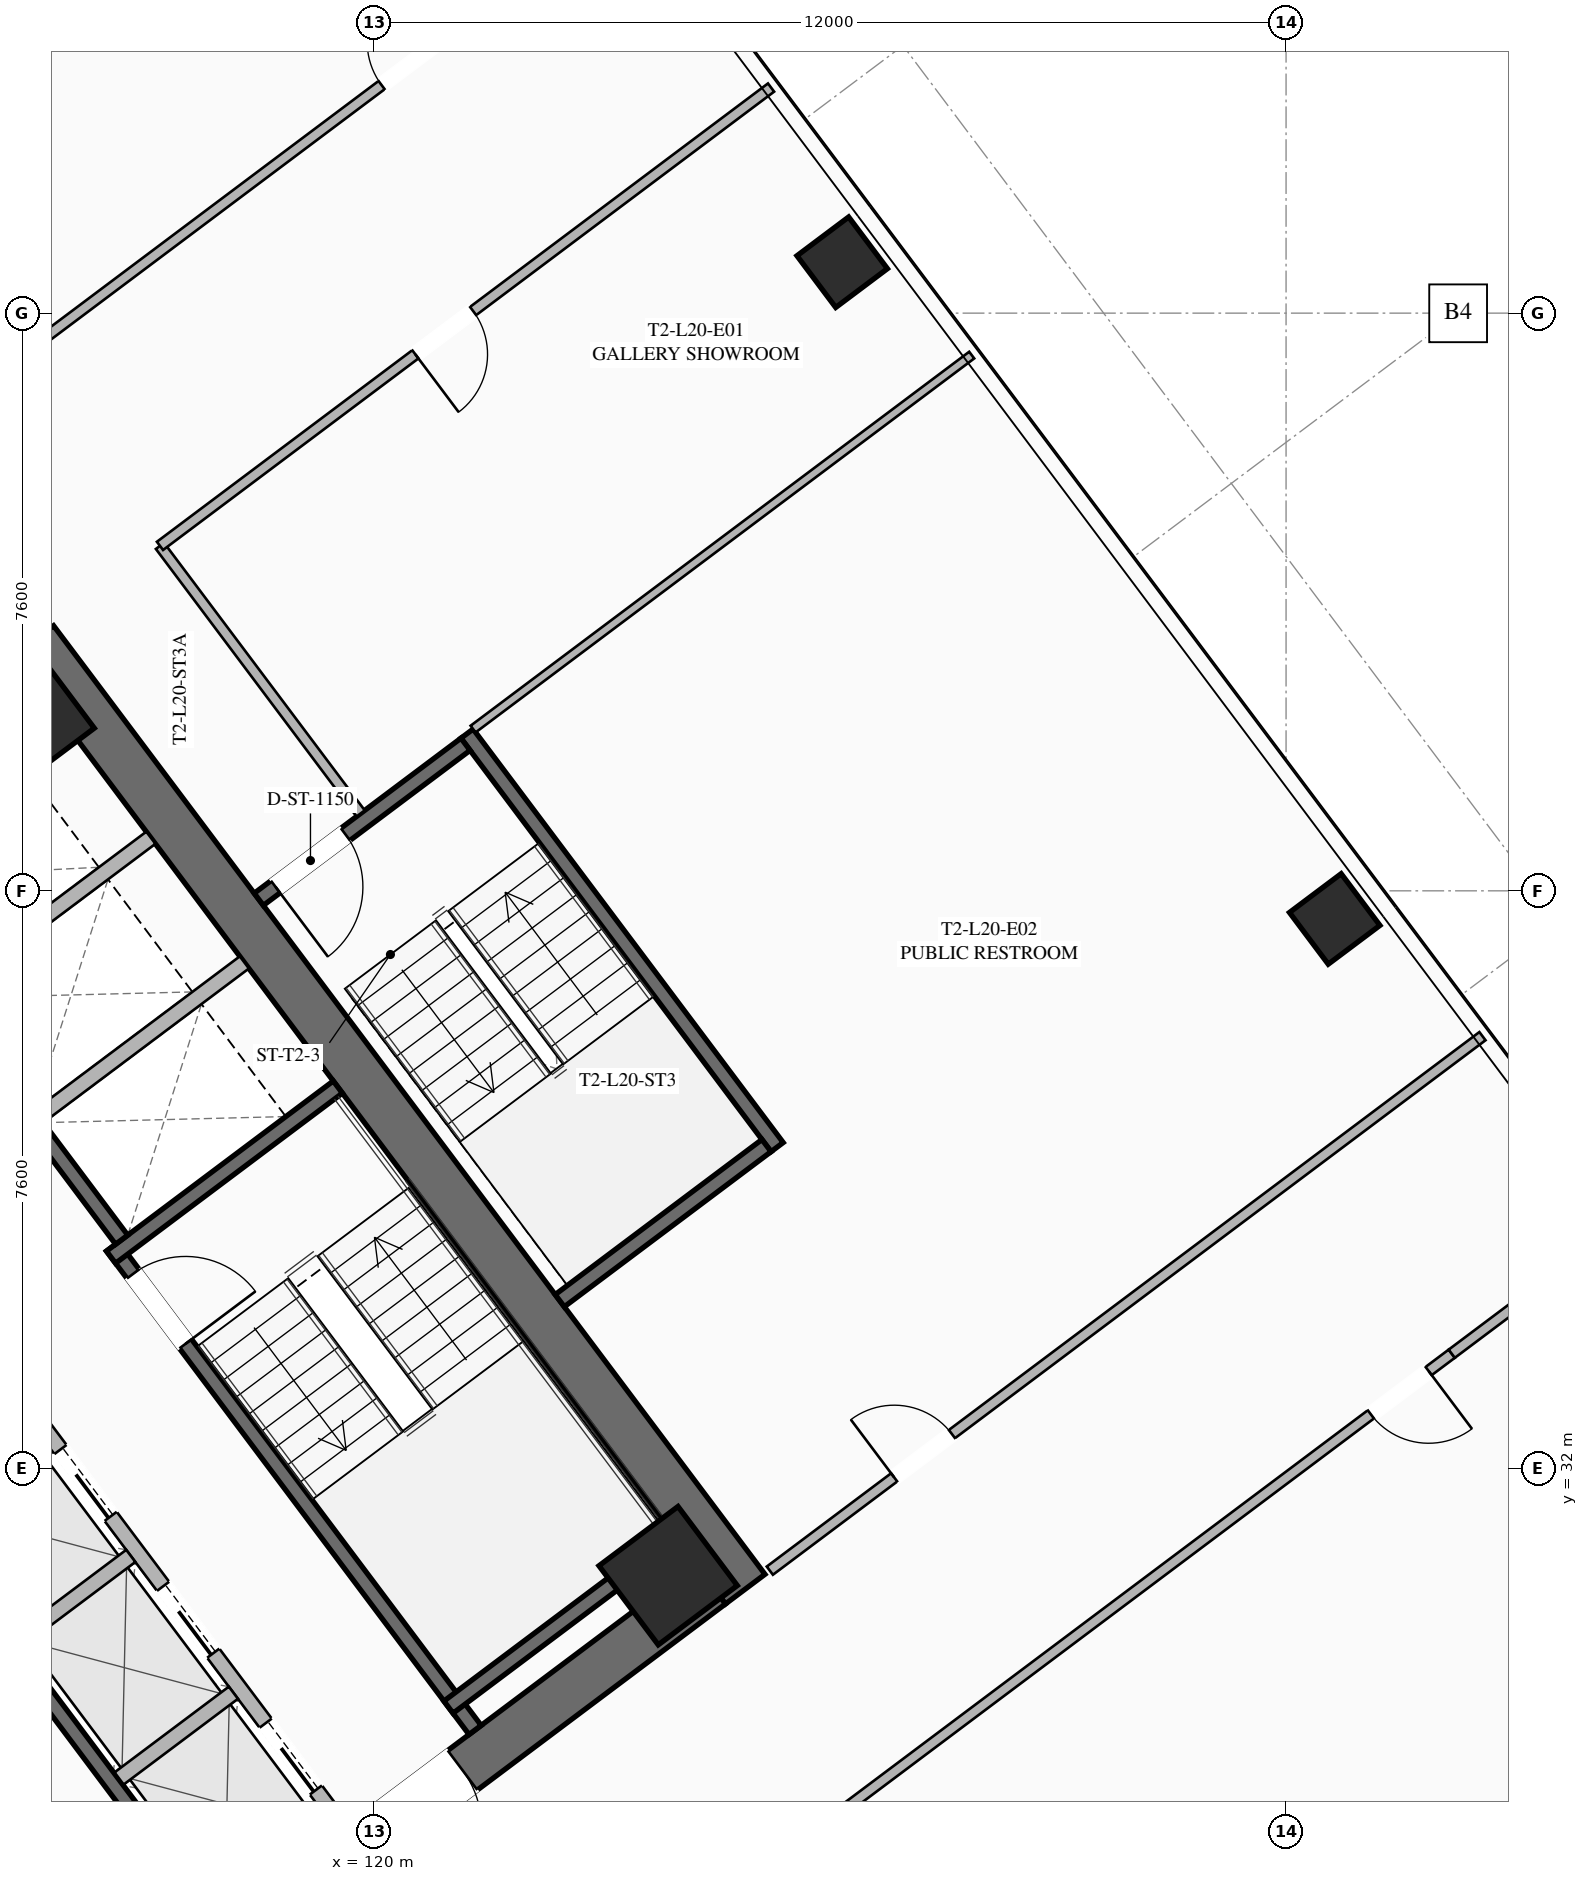
"""IFC4 building model, lengths in metres.
Left out: names, types, materials, properties, quantities, classifications, styles, units other than length and angle.
Written with IfcOpenShell. Run it as: python <this file> out.ifc"""

import sys

from ifc_helpers import new_model, si_unit, direction, frame, frame_2d, origin, origin_2d, place, context, subcontext, project, spatial, rectangle, hollow_rectangle, extrude, element, fill, save


model = new_model("IFC4")
c1 = context("Model", 3, precision=1e-05, world=origin(), true_north=direction((0.0, 1.0)))
c2 = subcontext(c1, "Body", "Model", "MODEL_VIEW")
j1 = project(units=[si_unit("LENGTHUNIT", "METRE"), si_unit("PLANEANGLEUNIT", "RADIAN")], contexts=[c1])
p1 = place(None, origin())
s1 = spatial("IfcSite", under=j1, at=p1, CompositionType="ELEMENT")
p2 = place(p1, origin())
s2 = spatial("IfcBuilding", under=s1, at=p2, CompositionType="ELEMENT")
p3 = place(p2, frame((0.0, 0.0, 77.85)))
s3 = spatial("IfcBuildingStorey", under=s2, at=p3, CompositionType="ELEMENT", Elevation=77.85)
p4 = place(p3, frame((115.524, 42.893, 0.0), z_axis=(0.0, 0.0, 1.0), x_axis=(0.600005007985, -0.799996243986, 0.0)))
e1 = element("IfcWall", 1, at=p4, inside=s3, PredefinedType="SHEAR", context=c2, shape_type="SweptSolid", body=[
    extrude(rectangle(XDim=15.6, YDim=0.65, at=frame_2d((7.8, 0.0))), origin(), (0.0, 0.0, 1.0), 3.55),
])
p5 = place(p3, frame((124.429, 30.478, 0.0), z_axis=(0.0, 0.0, 1.0), x_axis=(-0.799998028465, -0.600002628705, 0.0)))
e2 = element("IfcWall", 2, at=p5, inside=s3, PredefinedType="SHEAR", context=c2, shape_type="SweptSolid", body=[
    extrude(rectangle(XDim=14.86, YDim=0.65, at=frame_2d((7.43, 0.0))), origin(), (0.0, 0.0, 1.0), 3.55),
])
p6 = place(p5, frame((9.13, 0.0, 0.0)))
e3 = element("IfcOpeningElement", 3, at=p6, cuts=e2, PredefinedType="OPENING", context=c2, shape_type="SweptSolid", body=[
    extrude(rectangle(XDim=1.25, YDim=2.25, at=frame_2d((0.625, 1.125))), frame((0.0, 0.335, 0.0), z_axis=(0.0, -1.0, 0.0), x_axis=(1.0, 0.0, 0.0)), (0.0, 0.0, 1.0), 0.67),
])
p7 = place(p5, frame((4.08, 0.0, 0.0)))
e4 = element("IfcOpeningElement", 4, at=p7, cuts=e2, PredefinedType="OPENING", context=c2, shape_type="SweptSolid", body=[
    extrude(rectangle(XDim=1.25, YDim=2.25, at=frame_2d((0.625, 1.125))), frame((0.0, 0.335, 0.0), z_axis=(0.0, -1.0, 0.0), x_axis=(1.0, 0.0, 0.0)), (0.0, 0.0, 1.0), 0.67),
])
for number, where, z_axis, x_axis in (
    (5, (123.87, 30.59, 0.0), (0.0, 0.0, 1.0), (0.8, 0.6, 0.0)),
    (6, (115.41, 41.87, 0.0), (0.0, 0.0, 1.0), (0.8, 0.6, 0.0)),
):
    element("IfcColumn", number, at=place(p3, frame(where, z_axis=z_axis, x_axis=x_axis)), inside=s3, PredefinedType="COLUMN", context=c2, shape_type="SweptSolid", body=[
        extrude(hollow_rectangle(XDim=1.3, YDim=1.3, WallThickness=0.05, at=origin_2d()), origin(), (0.0, 0.0, 1.0), 3.35),
    ])
for number, where, z_axis, x_axis in (
    (7, (132.64, 39.23, 0.0), (0.0, 0.0, 1.0), (0.8, 0.6, 0.0)),
    (8, (126.16, 47.87, 0.0), (0.0, 0.0, 1.0), (0.8, 0.6, 0.0)),
):
    element("IfcColumn", number, at=place(p3, frame(where, z_axis=z_axis, x_axis=x_axis)), inside=s3, PredefinedType="COLUMN", context=c2, shape_type="SweptSolid", body=[
        extrude(hollow_rectangle(XDim=0.85, YDim=0.85, WallThickness=0.035, at=origin_2d()), origin(), (0.0, 0.0, 1.0), 3.35),
    ])
p8 = place(p3, frame((116.56, 34.92, 0.0), z_axis=(0.0, 0.0, 1.0), x_axis=(0.600009827119, -0.799992629566, 0.0)))
e9 = element("IfcWall", 9, at=p8, inside=s3, PredefinedType="SHEAR", context=c2, shape_type="SweptSolid", body=[
    extrude(rectangle(XDim=7.95, YDim=0.2, at=frame_2d((3.975, 0.0))), origin(), (0.0, 0.0, 1.0), 3.35),
])
p9 = place(p8, frame((0.45, 0.0, 0.0)))
e10 = element("IfcOpeningElement", 10, at=p9, cuts=e9, PredefinedType="OPENING", context=c2, shape_type="SweptSolid", body=[
    extrude(rectangle(XDim=1.15, YDim=2.2, at=frame_2d((0.575, 1.1))), frame((0.0, 0.11, 0.0), z_axis=(0.0, -1.0, 0.0), x_axis=(1.0, 0.0, 0.0)), (0.0, 0.0, 1.0), 0.22),
])
for number, where, z_axis, x_axis in (
    (11, (116.54, 34.78, 0.0), (0.0, 0.0, 1.0), (0.8, 0.6, 0.0)),
    (12, (120.98, 28.86, 0.0), (0.0, 0.0, 1.0), (0.8, 0.6, 0.0)),
):
    element("IfcWall", number, at=place(p3, frame(where, z_axis=z_axis, x_axis=x_axis)), inside=s3, PredefinedType="SHEAR", context=c2, shape_type="SweptSolid", body=[
        extrude(rectangle(XDim=3.73, YDim=0.2, at=frame_2d((1.865, 0.0))), origin(), (0.0, 0.0, 1.0), 3.35),
    ])
p10 = place(p3, frame((117.938, 26.016, 0.0), z_axis=(0.0, 0.0, 1.0), x_axis=(-0.600005463273, 0.799995902516, 0.0)))
e13 = element("IfcWall", 13, at=p10, inside=s3, PredefinedType="SHEAR", context=c2, shape_type="SweptSolid", body=[
    extrude(rectangle(XDim=14.3, YDim=0.2, at=frame_2d((7.15, 0.0))), origin(), (0.0, 0.0, 1.0), 3.35),
])
p11 = place(p3, frame((112.87, 40.09, 0.0), z_axis=(0.0, 0.0, 1.0), x_axis=(0.599975393228, -0.800018454488, 0.0)))
e14 = element("IfcWall", 14, at=p11, inside=s3, PredefinedType="SHEAR", context=c2, shape_type="SweptSolid", body=[
    extrude(rectangle(XDim=6.35, YDim=0.2, at=frame_2d((3.175, 0.0))), origin(), (0.0, 0.0, 1.0), 3.35),
])
for number, where, z_axis, x_axis in (
    (15, (115.59, 36.63, 0.0), (0.0, 0.0, 1.0), (0.8, 0.6, 0.0)),
    (16, (114.36, 38.27, 0.0), (0.0, 0.0, 1.0), (0.8, 0.6, 0.0)),
):
    element("IfcWall", number, at=place(p3, frame(where, z_axis=z_axis, x_axis=x_axis)), inside=s3, PredefinedType="SOLIDWALL", context=c2, shape_type="SweptSolid", body=[
        extrude(rectangle(XDim=3.38, YDim=0.2, at=frame_2d((1.69, 0.0))), origin(), (0.0, 0.0, 1.0), 3.35),
    ])
p12 = place(p3, frame((119.61, 27.27, 0.0), z_axis=(0.0, 0.0, 1.0), x_axis=(-0.600011488909, 0.79999138319, 0.0)))
e17 = element("IfcWall", 17, at=p12, inside=s3, PredefinedType="SOLIDWALL", context=c2, shape_type="SweptSolid", body=[
    extrude(rectangle(XDim=6.8, YDim=0.2, at=frame_2d((3.4, 0.0))), origin(), (0.0, 0.0, 1.0), 3.35),
])
p13 = place(p12, frame((0.625, 0.0, 0.0)))
e18 = element("IfcOpeningElement", 18, at=p13, cuts=e17, PredefinedType="OPENING", context=c2, shape_type="SweptSolid", body=[
    extrude(rectangle(XDim=1.1, YDim=2.2, at=frame_2d((0.55, 1.1))), frame((0.0, 0.11, 0.0), z_axis=(0.0, -1.0, 0.0), x_axis=(1.0, 0.0, 0.0)), (0.0, 0.0, 1.0), 0.22),
])
p14 = place(p12, frame((2.875, 0.0, 0.0)))
e19 = element("IfcOpeningElement", 19, at=p14, cuts=e17, PredefinedType="OPENING", context=c2, shape_type="SweptSolid", body=[
    extrude(rectangle(XDim=1.1, YDim=2.2, at=frame_2d((0.55, 1.1))), frame((0.0, 0.11, 0.0), z_axis=(0.0, -1.0, 0.0), x_axis=(1.0, 0.0, 0.0)), (0.0, 0.0, 1.0), 0.22),
])
p15 = place(p12, frame((5.125, 0.0, 0.0)))
e20 = element("IfcOpeningElement", 20, at=p15, cuts=e17, PredefinedType="OPENING", context=c2, shape_type="SweptSolid", body=[
    extrude(rectangle(XDim=1.1, YDim=2.2, at=frame_2d((0.55, 1.1))), frame((0.0, 0.11, 0.0), z_axis=(0.0, -1.0, 0.0), x_axis=(1.0, 0.0, 0.0)), (0.0, 0.0, 1.0), 0.22),
])
p16 = place(p3, frame((116.646, 27.922, 0.0), z_axis=(0.0, 0.0, 1.0), x_axis=(0.8, 0.6, 0.0)))
e21 = element("IfcWall", 21, at=p16, inside=s3, PredefinedType="SOLIDWALL", context=c2, shape_type="SweptSolid", body=[
    extrude(rectangle(XDim=1.88, YDim=0.2, at=frame_2d((0.94, 0.0))), origin(), (0.0, 0.0, 1.0), 3.35),
])
p17 = place(p3, frame((115.296, 29.722, 0.0), z_axis=(0.0, 0.0, 1.0), x_axis=(0.799984418148, 0.600020775241, 0.0)))
e22 = element("IfcWall", 22, at=p17, inside=s3, PredefinedType="SOLIDWALL", context=c2, shape_type="SweptSolid", body=[
    extrude(rectangle(XDim=1.88, YDim=0.2, at=frame_2d((0.94, 0.0))), origin(), (0.0, 0.0, 1.0), 3.35),
])
p18 = place(p3, frame((125.304, 36.228, 0.0), z_axis=(0.0, 0.0, 1.0), x_axis=(-0.59998851072, 0.800008616831, 0.0)))
e23 = element("IfcWall", 23, at=p18, inside=s3, PredefinedType="SHEAR", context=c2, shape_type="SweptSolid", body=[
    extrude(rectangle(XDim=6.8, YDim=0.2, at=frame_2d((3.4, 0.0))), origin(), (0.0, 0.0, 1.0), 3.35),
])
p19 = place(p3, frame((121.204, 41.528, 0.0), z_axis=(0.0, 0.0, 1.0), x_axis=(-0.800017232136, -0.599977023131, 0.0)))
e24 = element("IfcWall", 24, at=p19, inside=s3, PredefinedType="SHEAR", context=c2, shape_type="SweptSolid", body=[
    extrude(rectangle(XDim=3.4, YDim=0.2, at=frame_2d((1.7, 0.0))), origin(), (0.0, 0.0, 1.0), 3.35),
])
p20 = place(p19, frame((1.975, 0.0, 0.0)))
e25 = element("IfcOpeningElement", 25, at=p20, cuts=e24, PredefinedType="OPENING", context=c2, shape_type="SweptSolid", body=[
    extrude(rectangle(XDim=1.15, YDim=2.2, at=frame_2d((0.575, 1.1))), frame((0.0, 0.11, 0.0), z_axis=(0.0, -1.0, 0.0), x_axis=(1.0, 0.0, 0.0)), (0.0, 0.0, 1.0), 0.22),
])
p21 = place(p3, frame((122.444, 34.208, 0.0), z_axis=(0.0, 0.0, 1.0), x_axis=(0.79999138319, 0.600011488909, 0.0)))
e26 = element("IfcWall", 26, at=p21, inside=s3, PredefinedType="SHEAR", context=c2, shape_type="SweptSolid", body=[
    extrude(rectangle(XDim=3.4, YDim=0.2, at=frame_2d((1.7, 0.0))), origin(), (0.0, 0.0, 1.0), 3.35),
])
p22 = place(p3, frame((119.824, 40.618, 0.0), z_axis=(0.0, 0.0, 1.0), x_axis=(-0.599982243973, 0.800013316712, 0.0)))
e27 = element("IfcWall", 27, at=p22, inside=s3, PredefinedType="PARTITIONING", context=c2, shape_type="SweptSolid", body=[
    extrude(rectangle(XDim=4.4, YDim=0.135, at=frame_2d((2.2, 0.0))), origin(), (0.0, 0.0, 1.0), 2.703),
])
p23 = place(p3, frame((98.516, 34.012, 0.0), z_axis=(0.0, 0.0, 1.0), x_axis=(0.8, 0.6, 0.0)))
e28 = element("IfcWall", 28, at=p23, inside=s3, PredefinedType="PARTITIONING", context=c2, shape_type="SweptSolid", body=[
    extrude(rectangle(XDim=28.23, YDim=0.135, at=frame_2d((14.115, 0.0))), origin(), (0.0, 0.0, 1.0), 2.703),
])
p24 = place(p23, frame((0.3, 0.0, 0.0)))
e29 = element("IfcOpeningElement", 29, at=p24, cuts=e28, PredefinedType="OPENING", context=c2, shape_type="SweptSolid", body=[
    extrude(rectangle(XDim=0.95, YDim=2.05, at=frame_2d((0.475, 1.025))), frame((0.0, 0.077, 0.0), z_axis=(0.0, -1.0, 0.0), x_axis=(1.0, 0.0, 0.0)), (0.0, 0.0, 1.0), 0.155),
])
p25 = place(p23, frame((11.004, 0.0, 0.0)))
e30 = element("IfcOpeningElement", 30, at=p25, cuts=e28, PredefinedType="OPENING", context=c2, shape_type="SweptSolid", body=[
    extrude(rectangle(XDim=0.95, YDim=2.05, at=frame_2d((0.475, 1.025))), frame((0.0, 0.077, 0.0), z_axis=(0.0, -1.0, 0.0), x_axis=(1.0, 0.0, 0.0)), (0.0, 0.0, 1.0), 0.155),
])
p26 = place(p23, frame((26.98, 0.0, 0.0)))
e31 = element("IfcOpeningElement", 31, at=p26, cuts=e28, PredefinedType="OPENING", context=c2, shape_type="SweptSolid", body=[
    extrude(rectangle(XDim=0.95, YDim=2.05, at=frame_2d((0.475, 1.025))), frame((0.0, 0.077, 0.0), z_axis=(0.0, -1.0, 0.0), x_axis=(1.0, 0.0, 0.0)), (0.0, 0.0, 1.0), 0.155),
])
p27 = place(p3, frame((134.18, 33.51, 0.0), z_axis=(0.0, 0.0, 1.0), x_axis=(-0.8, -0.6, 0.0)))
e32 = element("IfcWall", 32, at=p27, inside=s3, PredefinedType="PARTITIONING", context=c2, shape_type="SweptSolid", body=[
    extrude(rectangle(XDim=28.23, YDim=0.135, at=frame_2d((14.115, 0.0))), origin(), (0.0, 0.0, 1.0), 2.703),
])
p28 = place(p27, frame((26.9, 0.0, 0.0)))
e33 = element("IfcOpeningElement", 33, at=p28, cuts=e32, PredefinedType="OPENING", context=c2, shape_type="SweptSolid", body=[
    extrude(rectangle(XDim=0.95, YDim=2.05, at=frame_2d((0.475, 1.025))), frame((0.0, 0.077, 0.0), z_axis=(0.0, -1.0, 0.0), x_axis=(1.0, 0.0, 0.0)), (0.0, 0.0, 1.0), 0.155),
])
p29 = place(p27, frame((16.453, 0.0, 0.0)))
e34 = element("IfcOpeningElement", 34, at=p29, cuts=e32, PredefinedType="OPENING", context=c2, shape_type="SweptSolid", body=[
    extrude(rectangle(XDim=0.95, YDim=2.05, at=frame_2d((0.475, 1.025))), frame((0.0, 0.077, 0.0), z_axis=(0.0, -1.0, 0.0), x_axis=(1.0, 0.0, 0.0)), (0.0, 0.0, 1.0), 0.155),
])
p30 = place(p27, frame((0.38, 0.0, 0.0)))
e35 = element("IfcOpeningElement", 35, at=p30, cuts=e32, PredefinedType="OPENING", context=c2, shape_type="SweptSolid", body=[
    extrude(rectangle(XDim=0.95, YDim=2.05, at=frame_2d((0.475, 1.025))), frame((0.0, 0.077, 0.0), z_axis=(0.0, -1.0, 0.0), x_axis=(1.0, 0.0, 0.0)), (0.0, 0.0, 1.0), 0.155),
])
p31 = place(p3, frame((134.18, 33.51, 0.0), z_axis=(0.0, 0.0, 1.0), x_axis=(0.8000207031, 0.599972394874, 0.0)))
e36 = element("IfcWall", 36, at=p31, inside=s3, PredefinedType="PARTITIONING", context=c2, shape_type="SweptSolid", body=[
    extrude(rectangle(XDim=2.83, YDim=0.135, at=frame_2d((1.415, 0.0))), origin(), (0.0, 0.0, 1.0), 2.703),
])
p32 = place(p3, frame((125.224, 50.168, 0.0), z_axis=(0.0, 0.0, 1.0), x_axis=(-0.8, -0.6, 0.0)))
e37 = element("IfcWall", 37, at=p32, inside=s3, PredefinedType="PARTITIONING", context=c2, shape_type="SweptSolid", body=[
    extrude(rectangle(XDim=10.05, YDim=0.135, at=frame_2d((5.025, 0.0))), origin(), (0.0, 0.0, 1.0), 2.703),
])
p33 = place(p32, frame((4.9, 0.0, 0.0)))
e38 = element("IfcOpeningElement", 38, at=p33, cuts=e37, PredefinedType="OPENING", context=c2, shape_type="SweptSolid", body=[
    extrude(rectangle(XDim=0.95, YDim=2.05, at=frame_2d((0.475, 1.025))), frame((0.0, 0.077, 0.0), z_axis=(0.0, -1.0, 0.0), x_axis=(1.0, 0.0, 0.0)), (0.0, 0.0, 1.0), 0.155),
])
p34 = place(p3, frame((125.208, 30.656, 0.0), z_axis=(0.0, 0.0, 1.0), x_axis=(0.8, 0.6, 0.0)))
e39 = element("IfcWall", 39, at=p34, inside=s3, PredefinedType="PARTITIONING", context=c2, shape_type="SweptSolid", body=[
    extrude(rectangle(XDim=11.72, YDim=0.135, at=frame_2d((5.86, 0.0))), origin(), (0.0, 0.0, 1.0), 2.703),
])
p35 = place(p34, frame((2.045, 0.0, 0.0)))
e40 = element("IfcOpeningElement", 40, at=p35, cuts=e39, PredefinedType="OPENING", context=c2, shape_type="SweptSolid", body=[
    extrude(rectangle(XDim=0.95, YDim=2.05, at=frame_2d((0.475, 1.025))), frame((0.0, 0.077, 0.0), z_axis=(0.0, -1.0, 0.0), x_axis=(1.0, 0.0, 0.0)), (0.0, 0.0, 1.0), 0.155),
])
p36 = place(p3, frame((127.864, 46.648, 0.0), z_axis=(0.0, 0.0, 1.0), x_axis=(-0.800007145523, -0.599990472518, 0.0)))
e41 = element("IfcWall", 41, at=p36, inside=s3, PredefinedType="PARTITIONING", context=c2, shape_type="SweptSolid", body=[
    extrude(rectangle(XDim=8.2, YDim=0.11, at=frame_2d((4.1, 0.0))), origin(), (0.0, 0.0, 1.0), 2.703),
])
p37 = place(p7, origin())
e42 = element("IfcDoor", 42, at=p37, inside=s3, OperationType="SINGLE_SWING_RIGHT", PredefinedType="DOOR", context=c2, shape_type="SweptSolid", body=[
    extrude(rectangle(XDim=1.25, YDim=2.25, at=frame_2d((0.625, 1.125))), frame((0.0, 0.025, 0.0), z_axis=(0.0, -1.0, 0.0), x_axis=(1.0, 0.0, 0.0)), (0.0, 0.0, 1.0), 0.05),
])
fill(e4, e42)
p38 = place(p9, origin())
e43 = element("IfcDoor", 43, at=p38, inside=s3, OperationType="SINGLE_SWING_RIGHT", PredefinedType="DOOR", context=c2, shape_type="SweptSolid", body=[
    extrude(rectangle(XDim=1.15, YDim=2.2, at=frame_2d((0.575, 1.1))), frame((0.0, 0.025, 0.0), z_axis=(0.0, -1.0, 0.0), x_axis=(1.0, 0.0, 0.0)), (0.0, 0.0, 1.0), 0.05),
])
fill(e10, e43)
p39 = place(p20, origin())
e44 = element("IfcDoor", 44, at=p39, inside=s3, OperationType="SINGLE_SWING_RIGHT", PredefinedType="DOOR", context=c2, shape_type="SweptSolid", body=[
    extrude(rectangle(XDim=1.15, YDim=2.2, at=frame_2d((0.575, 1.1))), frame((0.0, 0.025, 0.0), z_axis=(0.0, -1.0, 0.0), x_axis=(1.0, 0.0, 0.0)), (0.0, 0.0, 1.0), 0.05),
])
fill(e25, e44)
p40 = place(p26, origin())
e45 = element("IfcDoor", 45, at=p40, inside=s3, OperationType="SINGLE_SWING_RIGHT", PredefinedType="DOOR", context=c2, shape_type="SweptSolid", body=[
    extrude(rectangle(XDim=0.95, YDim=2.05, at=frame_2d((0.475, 1.025))), frame((0.0, 0.025, 0.0), z_axis=(0.0, -1.0, 0.0), x_axis=(1.0, 0.0, 0.0)), (0.0, 0.0, 1.0), 0.05),
])
fill(e31, e45)
p41 = place(p30, origin())
e46 = element("IfcDoor", 46, at=p41, inside=s3, OperationType="SINGLE_SWING_LEFT", PredefinedType="DOOR", context=c2, shape_type="SweptSolid", body=[
    extrude(rectangle(XDim=0.95, YDim=2.05, at=frame_2d((0.475, 1.025))), frame((0.0, 0.025, 0.0), z_axis=(0.0, -1.0, 0.0), x_axis=(1.0, 0.0, 0.0)), (0.0, 0.0, 1.0), 0.05),
])
fill(e35, e46)
p42 = place(p33, origin())
e47 = element("IfcDoor", 47, at=p42, inside=s3, OperationType="SINGLE_SWING_RIGHT", PredefinedType="DOOR", context=c2, shape_type="SweptSolid", body=[
    extrude(rectangle(XDim=0.95, YDim=2.05, at=frame_2d((0.475, 1.025))), frame((0.0, 0.025, 0.0), z_axis=(0.0, -1.0, 0.0), x_axis=(1.0, 0.0, 0.0)), (0.0, 0.0, 1.0), 0.05),
])
fill(e38, e47)
p43 = place(p35, origin())
e48 = element("IfcDoor", 48, at=p43, inside=s3, OperationType="SINGLE_SWING_LEFT", PredefinedType="DOOR", context=c2, shape_type="SweptSolid", body=[
    extrude(rectangle(XDim=0.95, YDim=2.05, at=frame_2d((0.475, 1.025))), frame((0.0, 0.025, 0.0), z_axis=(0.0, -1.0, 0.0), x_axis=(1.0, 0.0, 0.0)), (0.0, 0.0, 1.0), 0.05),
])
fill(e40, e48)
p44 = place(p13, origin())
e49 = element("IfcDoor", 49, at=p44, inside=s3, OperationType="SLIDING_TO_LEFT", PredefinedType="DOOR", context=c2, shape_type="SweptSolid", body=[
    extrude(rectangle(XDim=1.1, YDim=2.2, at=frame_2d((0.55, 1.1))), frame((0.0, 0.025, 0.0), z_axis=(0.0, -1.0, 0.0), x_axis=(1.0, 0.0, 0.0)), (0.0, 0.0, 1.0), 0.05),
])
fill(e18, e49)
p45 = place(p14, origin())
e50 = element("IfcDoor", 50, at=p45, inside=s3, OperationType="SLIDING_TO_LEFT", PredefinedType="DOOR", context=c2, shape_type="SweptSolid", body=[
    extrude(rectangle(XDim=1.1, YDim=2.2, at=frame_2d((0.55, 1.1))), frame((0.0, 0.025, 0.0), z_axis=(0.0, -1.0, 0.0), x_axis=(1.0, 0.0, 0.0)), (0.0, 0.0, 1.0), 0.05),
])
fill(e19, e50)
p46 = place(p15, origin())
e51 = element("IfcDoor", 51, at=p46, inside=s3, OperationType="SLIDING_TO_LEFT", PredefinedType="DOOR", context=c2, shape_type="SweptSolid", body=[
    extrude(rectangle(XDim=1.1, YDim=2.2, at=frame_2d((0.55, 1.1))), frame((0.0, 0.025, 0.0), z_axis=(0.0, -1.0, 0.0), x_axis=(1.0, 0.0, 0.0)), (0.0, 0.0, 1.0), 0.05),
])
fill(e20, e51)
save(model, sys.argv[1])
